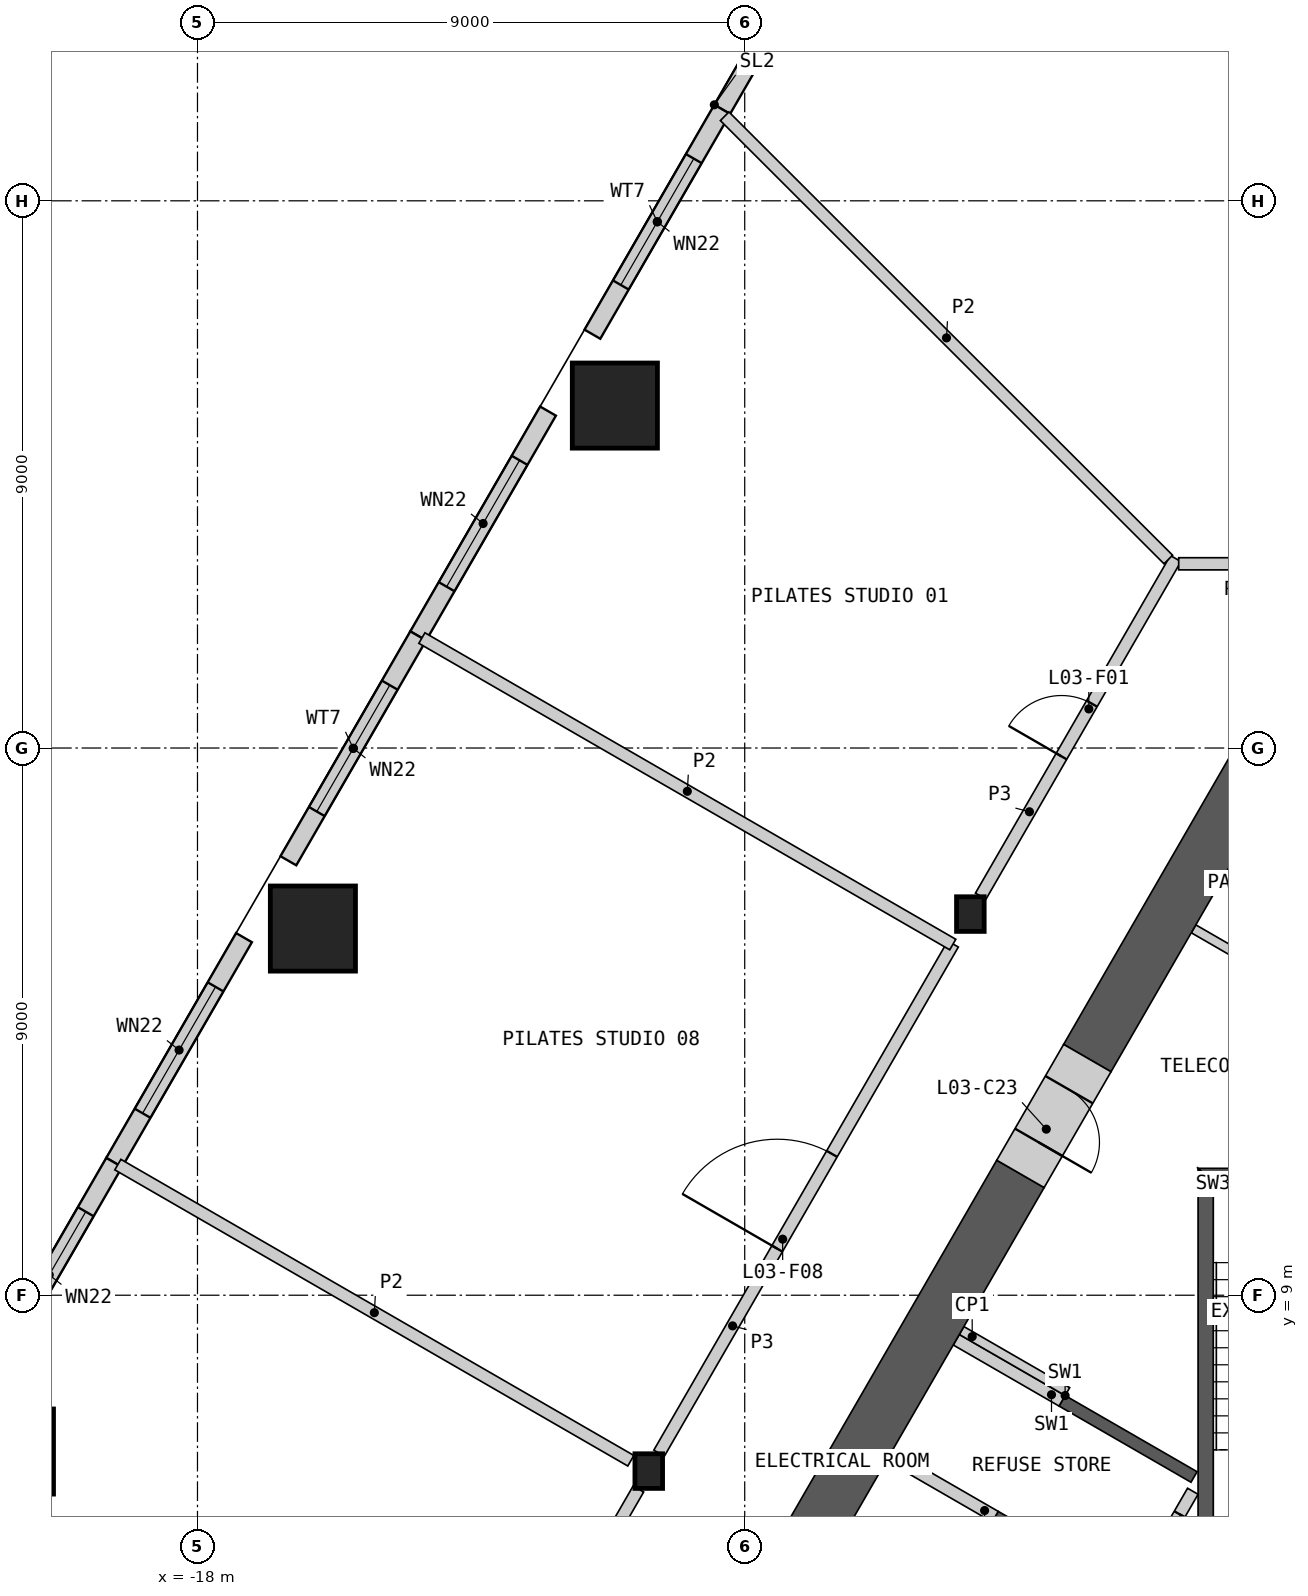
"""IFC4 building model, lengths in metres.
Left out: names, types, materials, properties, quantities, classifications, styles, units other than length and angle.
Written with IfcOpenShell. Run it as: python <this file> out.ifc"""

import sys

from ifc_helpers import new_model, si_unit, direction, frame, frame_2d, origin, origin_2d, place, context, subcontext, project, spatial, polyline, rectangle, hollow_rectangle, i_section, outline, extrude, element, fill, save


model = new_model("IFC4")
c1 = context("Model", 3, precision=1e-05, world=origin(), true_north=direction((0.0, 1.0)))
c2 = subcontext(c1, "Body", "Model", "MODEL_VIEW")
j1 = project(units=[si_unit("LENGTHUNIT", "METRE"), si_unit("PLANEANGLEUNIT", "RADIAN")], contexts=[c1])
p1 = place(None, origin())
s1 = spatial("IfcSite", under=j1, at=p1, CompositionType="ELEMENT")
p2 = place(p1, origin())
s2 = spatial("IfcBuilding", under=s1, at=p2, CompositionType="ELEMENT")
p3 = place(p2, frame((0.0, 0.0, 21.0)))
s3 = spatial("IfcBuildingStorey", under=s2, at=p3, CompositionType="ELEMENT", Elevation=21.0)
for number, where, z_axis, x_axis in (
    (1, (-11.136, 23.632, 0.0), (0.0, 0.0, 1.0), (1.0, 0.0, 0.0)),
    (2, (-16.102, 15.031, 0.0), (0.0, 0.0, 1.0), (1.0, 0.0, 0.0)),
    (3, (-21.068, 6.429, 0.0), (0.0, 0.0, 1.0), (1.0, 0.0, 0.0)),
):
    element("IfcColumn", number, at=place(p3, frame(where, z_axis=z_axis, x_axis=x_axis)), inside=s3, PredefinedType="COLUMN", context=c2, shape_type="SweptSolid", body=[
        extrude(hollow_rectangle(XDim=1.4, YDim=1.4, WallThickness=0.1, at=origin_2d()), origin(), (0.0, 0.0, 1.0), 4.5),
    ])
for number, where, z_axis, x_axis in (
    (4, (-5.289, 15.269, 0.0), (0.0, 0.0, 1.0), (1.0, 0.0, 0.0)),
    (5, (-10.578, 6.107, 0.0), (0.0, 0.0, 1.0), (1.0, 0.0, 0.0)),
):
    element("IfcColumn", number, at=place(p3, frame(where, z_axis=z_axis, x_axis=x_axis)), inside=s3, PredefinedType="COLUMN", context=c2, shape_type="SweptSolid", body=[
        extrude(i_section(OverallWidth=0.454, OverallDepth=0.57, WebThickness=0.078, FlangeThickness=0.125, at=origin_2d()), origin(), (0.0, 0.0, 1.0), 4.5),
    ])
p4 = place(p3, frame((-7.235, 32.202, 0.0), z_axis=(0.0, 0.0, 1.0), x_axis=(-0.500019418418, -0.866014192265, 0.0)))
e6 = element("IfcWall", 6, at=p4, inside=s3, PredefinedType="SOLIDWALL", context=c2, shape_type="SweptSolid", body=[
    extrude(rectangle(XDim=4.27, YDim=0.3, at=frame_2d((2.135, 0.0))), origin(), (0.0, 0.0, 1.0), 4.05),
])
p5 = place(p4, frame((0.935, 0.0, 0.9)))
e7 = element("IfcOpeningElement", 7, at=p5, cuts=e6, PredefinedType="OPENING", context=c2, shape_type="SweptSolid", body=[
    extrude(rectangle(XDim=2.4, YDim=2.55, at=frame_2d((1.2, 1.275))), frame((0.0, 0.16, 0.0), z_axis=(0.0, -1.0, 0.0), x_axis=(1.0, 0.0, 0.0)), (0.0, 0.0, 1.0), 0.32),
])
p6 = place(p3, frame((-9.37, 28.504, 0.0), z_axis=(0.0, 0.0, 1.0), x_axis=(-0.499994660107, -0.866028486751, 0.0)))
e8 = element("IfcWall", 8, at=p6, inside=s3, PredefinedType="SOLIDWALL", context=c2, shape_type="SweptSolid", body=[
    extrude(rectangle(XDim=4.27, YDim=0.3, at=frame_2d((2.135, 0.0))), origin(), (0.0, 0.0, 1.0), 4.05),
])
p7 = place(p6, frame((0.935, 0.0, 0.9)))
e9 = element("IfcOpeningElement", 9, at=p7, cuts=e8, PredefinedType="OPENING", context=c2, shape_type="SweptSolid", body=[
    extrude(rectangle(XDim=2.4, YDim=2.55, at=frame_2d((1.2, 1.275))), frame((0.0, 0.16, 0.0), z_axis=(0.0, -1.0, 0.0), x_axis=(1.0, 0.0, 0.0)), (0.0, 0.0, 1.0), 0.32),
])
p8 = place(p3, frame((-12.235, 23.542, 0.0), z_axis=(0.0, 0.0, 1.0), x_axis=(-0.499994660107, -0.866028486751, 0.0)))
e10 = element("IfcWall", 10, at=p8, inside=s3, PredefinedType="SOLIDWALL", context=c2, shape_type="SweptSolid", body=[
    extrude(rectangle(XDim=4.27, YDim=0.3, at=frame_2d((2.135, 0.0))), origin(), (0.0, 0.0, 1.0), 4.05),
])
p9 = place(p8, frame((0.935, 0.0, 0.9)))
e11 = element("IfcOpeningElement", 11, at=p9, cuts=e10, PredefinedType="OPENING", context=c2, shape_type="SweptSolid", body=[
    extrude(rectangle(XDim=2.4, YDim=2.55, at=frame_2d((1.2, 1.275))), frame((0.0, 0.16, 0.0), z_axis=(0.0, -1.0, 0.0), x_axis=(1.0, 0.0, 0.0)), (0.0, 0.0, 1.0), 0.32),
])
p10 = place(p3, frame((-14.37, 19.844, 0.0), z_axis=(0.0, 0.0, 1.0), x_axis=(-0.500019418418, -0.866014192265, 0.0)))
e12 = element("IfcWall", 12, at=p10, inside=s3, PredefinedType="SOLIDWALL", context=c2, shape_type="SweptSolid", body=[
    extrude(rectangle(XDim=4.27, YDim=0.3, at=frame_2d((2.135, 0.0))), origin(), (0.0, 0.0, 1.0), 4.05),
])
p11 = place(p10, frame((0.935, 0.0, 0.9)))
e13 = element("IfcOpeningElement", 13, at=p11, cuts=e12, PredefinedType="OPENING", context=c2, shape_type="SweptSolid", body=[
    extrude(rectangle(XDim=2.4, YDim=2.55, at=frame_2d((1.2, 1.275))), frame((0.0, 0.16, 0.0), z_axis=(0.0, -1.0, 0.0), x_axis=(1.0, 0.0, 0.0)), (0.0, 0.0, 1.0), 0.32),
])
p12 = place(p3, frame((-17.235, 14.881, 0.0), z_axis=(0.0, 0.0, 1.0), x_axis=(-0.499994660107, -0.866028486751, 0.0)))
e14 = element("IfcWall", 14, at=p12, inside=s3, PredefinedType="SOLIDWALL", context=c2, shape_type="SweptSolid", body=[
    extrude(rectangle(XDim=4.27, YDim=0.3, at=frame_2d((2.135, 0.0))), origin(), (0.0, 0.0, 1.0), 4.05),
])
p13 = place(p12, frame((0.935, 0.0, 0.9)))
e15 = element("IfcOpeningElement", 15, at=p13, cuts=e14, PredefinedType="OPENING", context=c2, shape_type="SweptSolid", body=[
    extrude(rectangle(XDim=2.4, YDim=2.55, at=frame_2d((1.2, 1.275))), frame((0.0, 0.16, 0.0), z_axis=(0.0, -1.0, 0.0), x_axis=(1.0, 0.0, 0.0)), (0.0, 0.0, 1.0), 0.32),
])
p14 = place(p3, frame((-19.37, 11.183, 0.0), z_axis=(0.0, 0.0, 1.0), x_axis=(-0.499982117899, -0.866035727774, 0.0)))
e16 = element("IfcWall", 16, at=p14, inside=s3, PredefinedType="SOLIDWALL", context=c2, shape_type="SweptSolid", body=[
    extrude(rectangle(XDim=4.612, YDim=0.3, at=frame_2d((2.306, 0.0))), origin(), (0.0, 0.0, 1.0), 4.05),
])
p15 = place(p14, frame((0.935, 0.0, 0.9)))
e17 = element("IfcOpeningElement", 17, at=p15, cuts=e16, PredefinedType="OPENING", context=c2, shape_type="SweptSolid", body=[
    extrude(rectangle(XDim=2.4, YDim=2.55, at=frame_2d((1.2, 1.275))), frame((0.0, 0.16, 0.0), z_axis=(0.0, -1.0, 0.0), x_axis=(1.0, 0.0, 0.0)), (0.0, 0.0, 1.0), 0.32),
])
p16 = place(p3, origin())
e18 = element("IfcWall", 18, at=p16, inside=s3, PredefinedType="SHEAR", context=c2, shape_type="SweptSolid", body=[
    extrude(outline(polyline([(-2.76, 4.019), (-4.931, 5.272), (-4.831, 5.445), (-2.66, 4.192), (-2.76, 4.019)])), origin(), (0.0, 0.0, 1.0), 4.05),
])
p17 = place(p3, origin())
e19 = element("IfcWall", 19, at=p17, inside=s3, PredefinedType="SHEAR", context=c2, shape_type="SweptSolid", body=[
    extrude(outline(polyline([(-3.731, 7.35), (-1.561, 6.097), (-1.66, 5.924), (-3.831, 7.177), (-3.731, 7.35)])), origin(), (0.0, 0.0, 1.0), 4.05),
])
p18 = place(p3, frame((-1.631, 5.776, 0.0), z_axis=(0.0, 0.0, 1.0), x_axis=(-0.499992876559, -0.866029516466, 0.0)))
e20 = element("IfcWall", 20, at=p18, inside=s3, PredefinedType="SOLIDWALL", context=c2, shape_type="SweptSolid", body=[
    extrude(rectangle(XDim=6.486, YDim=0.2, at=frame_2d((3.243, 0.0))), origin(), (0.0, 0.0, 1.0), 4.05),
])
p19 = place(p18, frame((0.437, 0.0, 0.0)))
e21 = element("IfcOpeningElement", 21, at=p19, cuts=e20, PredefinedType="OPENING", context=c2, shape_type="SweptSolid", body=[
    extrude(rectangle(XDim=0.9, YDim=2.1, at=frame_2d((0.45, 1.05))), frame((0.0, 0.11, 0.0), z_axis=(0.0, -1.0, 0.0), x_axis=(1.0, 0.0, 0.0)), (0.0, 0.0, 1.0), 0.22),
])
p20 = place(p18, frame((2.637, 0.0, 0.0)))
e22 = element("IfcOpeningElement", 22, at=p20, cuts=e20, PredefinedType="OPENING", context=c2, shape_type="SweptSolid", body=[
    extrude(rectangle(XDim=0.9, YDim=2.1, at=frame_2d((0.45, 1.05))), frame((0.0, 0.11, 0.0), z_axis=(0.0, -1.0, 0.0), x_axis=(1.0, 0.0, 0.0)), (0.0, 0.0, 1.0), 0.22),
])
p21 = place(p3, frame((-3.781, 7.263, 0.0), z_axis=(0.0, 0.0, 1.0), x_axis=(-0.865983199114, 0.50007309351, 0.0)))
e23 = element("IfcWall", 23, at=p21, inside=s3, PredefinedType="SHEAR", context=c2, shape_type="SweptSolid", body=[
    extrude(rectangle(XDim=2.009, YDim=0.2, at=frame_2d((1.004, 0.0))), origin(), (0.0, 0.0, 1.0), 4.05),
])
p22 = place(p3, frame((-4.881, 5.358, 0.0), z_axis=(0.0, 0.0, 1.0), x_axis=(-0.866035824272, 0.499981950752, 0.0)))
e24 = element("IfcWall", 24, at=p22, inside=s3, PredefinedType="SHEAR", context=c2, shape_type="SweptSolid", body=[
    extrude(rectangle(XDim=2.009, YDim=0.2, at=frame_2d((1.004, 0.0))), origin(), (0.0, 0.0, 1.0), 4.05),
])
p23 = place(p3, origin())
e25 = element("IfcWall", 25, at=p23, inside=s3, PredefinedType="SHEAR", context=c2, shape_type="SweptSolid", body=[
    extrude(outline(polyline([(1.544, 11.087), (-1.544, 11.087), (-1.294, 10.837), (1.294, 10.837), (1.544, 11.087)])), origin(), (0.0, 0.0, 1.0), 4.05),
])
p24 = place(p3, origin())
e26 = element("IfcWall", 26, at=p24, inside=s3, PredefinedType="SHEAR", context=c2, shape_type="SweptSolid", body=[
    extrude(outline(polyline([(-1.294, 10.837), (-1.544, 11.087), (-1.544, 5.237), (-1.294, 5.237), (-1.294, 10.837)])), origin(), (0.0, 0.0, 1.0), 4.05),
])
p25 = place(p3, frame((-3.693, 7.415, 0.0), z_axis=(0.0, 0.0, 1.0), x_axis=(-0.866035824272, 0.499981950752, 0.0)))
e27 = element("IfcWall", 27, at=p25, inside=s3, PredefinedType="PARTITIONING", context=c2, shape_type="SweptSolid", body=[
    extrude(rectangle(XDim=2.009, YDim=0.15, at=frame_2d((1.004, 0.0))), origin(), (0.0, 0.0, 1.0), 4.05),
])
p26 = place(p3, frame((-1.619, 15.026, 0.0), z_axis=(0.0, 0.0, 1.0), x_axis=(0.866015917575, -0.500016430238, 0.0)))
e28 = element("IfcWall", 28, at=p26, inside=s3, PredefinedType="PARTITIONING", context=c2, shape_type="SweptSolid", body=[
    extrude(rectangle(XDim=5.607, YDim=0.15, at=frame_2d((2.804, 0.0))), origin(), (0.0, 0.0, 1.0), 4.05),
])
p27 = place(p3, frame((-4.466, 10.995, 0.0), z_axis=(0.0, 0.0, 1.0), x_axis=(-0.500012427149, -0.866018228848, 0.0)))
e29 = element("IfcWall", 29, at=p27, inside=s3, PredefinedType="SHEAR", context=c2, shape_type="SweptSolid", body=[
    extrude(rectangle(XDim=7.409, YDim=0.9, at=frame_2d((3.705, 0.0))), origin(), (0.0, 0.0, 1.0), 4.05),
])
p28 = place(p3, frame((-0.39, 18.055, 0.0), z_axis=(0.0, 0.0, 1.0), x_axis=(-0.499981657175, -0.86603599376, 0.0)))
e30 = element("IfcWall", 30, at=p28, inside=s3, PredefinedType="SHEAR", context=c2, shape_type="SweptSolid", body=[
    extrude(rectangle(XDim=5.952, YDim=0.9, at=frame_2d((2.976, 0.0))), origin(), (0.0, 0.0, 1.0), 4.05),
])
p29 = place(p3, frame((-3.365, 12.9, 0.0), z_axis=(0.0, 0.0, 1.0), x_axis=(-0.500077893725, -0.86598042715, 0.0)))
e31 = element("IfcWall", 31, at=p29, inside=s3, PredefinedType="SHEAR", context=c2, shape_type="SweptSolid", body=[
    extrude(rectangle(XDim=2.2, YDim=0.9, at=frame_2d((1.1, 0.0))), origin(), (0.0, 0.0, 1.0), 4.05),
])
p30 = place(p29, frame((0.6, 0.0, 0.0)))
e32 = element("IfcOpeningElement", 32, at=p30, cuts=e31, PredefinedType="OPENING", context=c2, shape_type="SweptSolid", body=[
    extrude(rectangle(XDim=1.0, YDim=2.1, at=frame_2d((0.5, 1.05))), frame((0.0, 0.46, 0.0), z_axis=(0.0, -1.0, 0.0), x_axis=(1.0, 0.0, 0.0)), (0.0, 0.0, 1.0), 0.92),
])
p31 = place(p3, frame((-15.698, -2.759, 0.0), z_axis=(0.0, 0.0, 1.0), x_axis=(0.500004292778, 0.866022925334, 0.0)))
e33 = element("IfcWall", 33, at=p31, inside=s3, PredefinedType="PARTITIONING", context=c2, shape_type="SweptSolid", body=[
    extrude(rectangle(XDim=9.898, YDim=0.2, at=frame_2d((4.949, 0.0))), origin(), (0.0, 0.0, 1.0), 4.05),
])
p32 = place(p31, frame((4.1, 0.0, 0.0)))
e34 = element("IfcOpeningElement", 34, at=p32, cuts=e33, PredefinedType="OPENING", context=c2, shape_type="SweptSolid", body=[
    extrude(rectangle(XDim=1.8, YDim=2.1, at=frame_2d((0.9, 1.05))), frame((0.0, 0.11, 0.0), z_axis=(0.0, -1.0, 0.0), x_axis=(1.0, 0.0, 0.0)), (0.0, 0.0, 1.0), 0.22),
])
p33 = place(p3, frame((-10.408, 6.402, 0.0), z_axis=(0.0, 0.0, 1.0), x_axis=(0.499986904098, 0.866032964575, 0.0)))
e35 = element("IfcWall", 35, at=p33, inside=s3, PredefinedType="PARTITIONING", context=c2, shape_type="SweptSolid", body=[
    extrude(rectangle(XDim=9.67, YDim=0.2, at=frame_2d((4.835, 0.0))), origin(), (0.0, 0.0, 1.0), 4.05),
])
p34 = place(p33, frame((3.884, 0.0, 0.0)))
e36 = element("IfcOpeningElement", 36, at=p34, cuts=e35, PredefinedType="OPENING", context=c2, shape_type="SweptSolid", body=[
    extrude(rectangle(XDim=1.8, YDim=2.1, at=frame_2d((0.9, 1.05))), frame((0.0, 0.11, 0.0), z_axis=(0.0, -1.0, 0.0), x_axis=(1.0, 0.0, 0.0)), (0.0, 0.0, 1.0), 0.22),
])
p35 = place(p3, frame((-5.119, 15.563, 0.0), z_axis=(0.0, 0.0, 1.0), x_axis=(0.500004801114, 0.866022631842, 0.0)))
e37 = element("IfcWall", 37, at=p35, inside=s3, PredefinedType="PARTITIONING", context=c2, shape_type="SweptSolid", body=[
    extrude(rectangle(XDim=6.412, YDim=0.2, at=frame_2d((3.206, 0.0))), origin(), (0.0, 0.0, 1.0), 4.05),
])
p36 = place(p35, frame((2.656, 0.0, 0.0)))
e38 = element("IfcOpeningElement", 38, at=p36, cuts=e37, PredefinedType="OPENING", context=c2, shape_type="SweptSolid", body=[
    extrude(rectangle(XDim=1.0, YDim=2.1, at=frame_2d((0.5, 1.05))), frame((0.0, 0.11, 0.0), z_axis=(0.0, -1.0, 0.0), x_axis=(1.0, 0.0, 0.0)), (0.0, 0.0, 1.0), 0.22),
])
p37 = place(p3, frame((-1.863, 21.03, 0.0), z_axis=(0.0, 0.0, 1.0), x_axis=(1.0, 0.0, 0.0)))
e39 = element("IfcWall", 39, at=p37, inside=s3, PredefinedType="PARTITIONING", context=c2, shape_type="SweptSolid", body=[
    extrude(rectangle(XDim=3.726, YDim=0.2, at=frame_2d((1.863, 0.0))), origin(), (0.0, 0.0, 1.0), 4.05),
])
p38 = place(p37, frame((0.963, 0.0, 0.0)))
e40 = element("IfcOpeningElement", 40, at=p38, cuts=e39, PredefinedType="OPENING", context=c2, shape_type="SweptSolid", body=[
    extrude(rectangle(XDim=1.8, YDim=2.1, at=frame_2d((0.9, 1.05))), frame((0.0, 0.11, 0.0), z_axis=(0.0, -1.0, 0.0), x_axis=(1.0, 0.0, 0.0)), (0.0, 0.0, 1.0), 0.22),
])
p39 = place(p3, frame((-9.33, 28.391, 0.0), z_axis=(0.0, 0.0, 1.0), x_axis=(0.707402604593, -0.706810833968, 0.0)))
e41 = element("IfcWall", 41, at=p39, inside=s3, PredefinedType="PARTITIONING", context=c2, shape_type="SweptSolid", body=[
    extrude(rectangle(XDim=10.314, YDim=0.2, at=frame_2d((5.157, 0.0))), origin(), (0.0, 0.0, 1.0), 4.05),
])
p40 = place(p3, frame((-14.31, 19.809, 0.0), z_axis=(0.0, 0.0, 1.0), x_axis=(0.866017018378, -0.500014523669, 0.0)))
e42 = element("IfcWall", 42, at=p40, inside=s3, PredefinedType="PARTITIONING", context=c2, shape_type="SweptSolid", body=[
    extrude(rectangle(XDim=10.082, YDim=0.2, at=frame_2d((5.041, 0.0))), origin(), (0.0, 0.0, 1.0), 4.05),
])
p41 = place(p3, frame((-19.31, 11.148, 0.0), z_axis=(0.0, 0.0, 1.0), x_axis=(0.866029077831, -0.499993636311, 0.0)))
e43 = element("IfcWall", 43, at=p41, inside=s3, PredefinedType="PARTITIONING", context=c2, shape_type="SweptSolid", body=[
    extrude(rectangle(XDim=9.741, YDim=0.2, at=frame_2d((4.871, 0.0))), origin(), (0.0, 0.0, 1.0), 4.05),
])
p42 = place(p5, origin())
e44 = element("IfcWindow", 44, at=p42, inside=s3, PartitioningType="SINGLE_PANEL", PredefinedType="WINDOW", context=c2, shape_type="SweptSolid", body=[
    extrude(rectangle(XDim=2.4, YDim=2.55, at=frame_2d((1.2, 1.275))), frame((0.0, 0.03, 0.0), z_axis=(0.0, -1.0, 0.0), x_axis=(1.0, 0.0, 0.0)), (0.0, 0.0, 1.0), 0.06),
])
fill(e7, e44)
p43 = place(p7, origin())
e45 = element("IfcWindow", 45, at=p43, inside=s3, PartitioningType="SINGLE_PANEL", PredefinedType="WINDOW", context=c2, shape_type="SweptSolid", body=[
    extrude(rectangle(XDim=2.4, YDim=2.55, at=frame_2d((1.2, 1.275))), frame((0.0, 0.03, 0.0), z_axis=(0.0, -1.0, 0.0), x_axis=(1.0, 0.0, 0.0)), (0.0, 0.0, 1.0), 0.06),
])
fill(e9, e45)
p44 = place(p9, origin())
e46 = element("IfcWindow", 46, at=p44, inside=s3, PartitioningType="SINGLE_PANEL", PredefinedType="WINDOW", context=c2, shape_type="SweptSolid", body=[
    extrude(rectangle(XDim=2.4, YDim=2.55, at=frame_2d((1.2, 1.275))), frame((0.0, 0.03, 0.0), z_axis=(0.0, -1.0, 0.0), x_axis=(1.0, 0.0, 0.0)), (0.0, 0.0, 1.0), 0.06),
])
fill(e11, e46)
p45 = place(p11, origin())
e47 = element("IfcWindow", 47, at=p45, inside=s3, PartitioningType="SINGLE_PANEL", PredefinedType="WINDOW", context=c2, shape_type="SweptSolid", body=[
    extrude(rectangle(XDim=2.4, YDim=2.55, at=frame_2d((1.2, 1.275))), frame((0.0, 0.03, 0.0), z_axis=(0.0, -1.0, 0.0), x_axis=(1.0, 0.0, 0.0)), (0.0, 0.0, 1.0), 0.06),
])
fill(e13, e47)
p46 = place(p13, origin())
e48 = element("IfcWindow", 48, at=p46, inside=s3, PartitioningType="SINGLE_PANEL", PredefinedType="WINDOW", context=c2, shape_type="SweptSolid", body=[
    extrude(rectangle(XDim=2.4, YDim=2.55, at=frame_2d((1.2, 1.275))), frame((0.0, 0.03, 0.0), z_axis=(0.0, -1.0, 0.0), x_axis=(1.0, 0.0, 0.0)), (0.0, 0.0, 1.0), 0.06),
])
fill(e15, e48)
p47 = place(p15, origin())
e49 = element("IfcWindow", 49, at=p47, inside=s3, PartitioningType="SINGLE_PANEL", PredefinedType="WINDOW", context=c2, shape_type="SweptSolid", body=[
    extrude(rectangle(XDim=2.4, YDim=2.55, at=frame_2d((1.2, 1.275))), frame((0.0, 0.03, 0.0), z_axis=(0.0, -1.0, 0.0), x_axis=(1.0, 0.0, 0.0)), (0.0, 0.0, 1.0), 0.06),
])
fill(e17, e49)
p48 = place(p19, origin())
e50 = element("IfcDoor", 50, at=p48, inside=s3, OperationType="SINGLE_SWING_LEFT", PredefinedType="DOOR", context=c2, shape_type="SweptSolid", body=[
    extrude(rectangle(XDim=0.9, YDim=2.1, at=frame_2d((0.45, 1.05))), frame((0.0, 0.025, 0.0), z_axis=(0.0, -1.0, 0.0), x_axis=(1.0, 0.0, 0.0)), (0.0, 0.0, 1.0), 0.05),
])
fill(e21, e50)
p49 = place(p30, origin())
e51 = element("IfcDoor", 51, at=p49, inside=s3, OperationType="SINGLE_SWING_RIGHT", PredefinedType="DOOR", context=c2, shape_type="SweptSolid", body=[
    extrude(rectangle(XDim=1.0, YDim=2.1, at=frame_2d((0.5, 1.05))), frame((0.0, 0.205, 0.0), z_axis=(0.0, -1.0, 0.0), x_axis=(1.0, 0.0, 0.0)), (0.0, 0.0, 1.0), 0.05),
])
fill(e32, e51)
p50 = place(p36, origin())
e52 = element("IfcDoor", 52, at=p50, inside=s3, OperationType="SINGLE_SWING_LEFT", PredefinedType="DOOR", context=c2, shape_type="SweptSolid", body=[
    extrude(rectangle(XDim=1.0, YDim=2.1, at=frame_2d((0.5, 1.05))), frame((0.0, 0.025, 0.0), z_axis=(0.0, -1.0, 0.0), x_axis=(1.0, 0.0, 0.0)), (0.0, 0.0, 1.0), 0.05),
])
fill(e38, e52)
p51 = place(p34, origin())
e53 = element("IfcDoor", 53, at=p51, inside=s3, OperationType="DOUBLE_DOOR_SINGLE_SWING", PredefinedType="DOOR", context=c2, shape_type="SweptSolid", body=[
    extrude(rectangle(XDim=1.8, YDim=2.1, at=frame_2d((0.9, 1.05))), frame((0.0, 0.025, 0.0), z_axis=(0.0, -1.0, 0.0), x_axis=(1.0, 0.0, 0.0)), (0.0, 0.0, 1.0), 0.05),
])
fill(e36, e53)
save(model, sys.argv[1])
